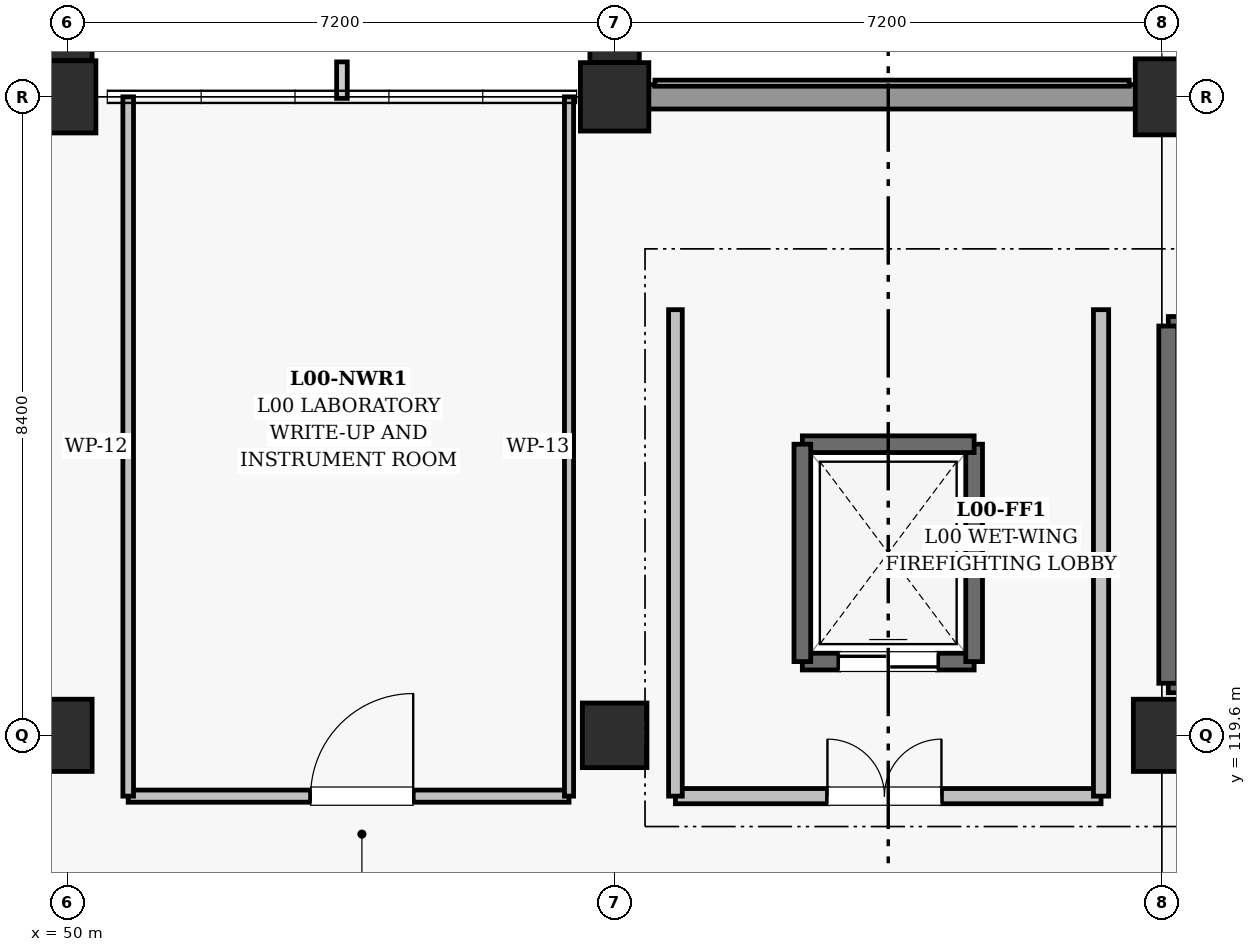
"""IFC4 building model, lengths in metres.
Left out: names, types, materials, properties, quantities, classifications, styles, units other than length and angle.
Written with IfcOpenShell. Run it as: python <this file> out.ifc"""

import sys

from ifc_helpers import new_model, si_unit, direction, frame, frame_2d, origin, origin_2d, place, context, subcontext, project, spatial, rectangle, extrude, element, fill, save


model = new_model("IFC4")
c1 = context("Model", 3, precision=1e-05, world=origin(), true_north=direction((0.0, 1.0)))
c2 = subcontext(c1, "Body", "Model", "MODEL_VIEW")
j1 = project(units=[si_unit("LENGTHUNIT", "METRE"), si_unit("PLANEANGLEUNIT", "RADIAN")], contexts=[c1])
p1 = place(None, origin())
s1 = spatial("IfcSite", under=j1, at=p1, CompositionType="ELEMENT")
p2 = place(p1, origin())
s2 = spatial("IfcBuilding", under=s1, at=p2, CompositionType="ELEMENT")
p3 = place(p2, origin())
s3 = spatial("IfcBuildingStorey", under=s2, at=p3, CompositionType="ELEMENT", Elevation=0.0)
p4 = place(p3, frame((50.0, 119.6, 0.0), z_axis=(0.0, 0.0, 1.0), x_axis=(1.0, 0.0, 0.0)))
e1 = element("IfcColumn", 1, at=p4, inside=s3, PredefinedType="COLUMN", context=c2, shape_type="SweptSolid", body=[
    extrude(rectangle(XDim=0.65, YDim=0.95, at=origin_2d()), origin(), (0.0, 0.0, 1.0), 5.4),
])
p5 = place(p3, frame((50.0, 128.0, 0.0), z_axis=(0.0, 0.0, 1.0), x_axis=(1.0, 0.0, 0.0)))
e2 = element("IfcColumn", 2, at=p5, inside=s3, PredefinedType="COLUMN", context=c2, shape_type="SweptSolid", body=[
    extrude(rectangle(XDim=0.75, YDim=0.95, at=origin_2d()), origin(), (0.0, 0.0, 1.0), 5.4),
])
p6 = place(p3, frame((57.2, 119.6, 0.0), z_axis=(0.0, 0.0, 1.0), x_axis=(1.0, 0.0, 0.0)))
e3 = element("IfcColumn", 3, at=p6, inside=s3, PredefinedType="COLUMN", context=c2, shape_type="SweptSolid", body=[
    extrude(rectangle(XDim=0.85, YDim=0.85, at=origin_2d()), origin(), (0.0, 0.0, 1.0), 5.4),
])
p7 = place(p3, frame((57.2, 128.0, 0.0), z_axis=(0.0, 0.0, 1.0), x_axis=(1.0, 0.0, 0.0)))
e4 = element("IfcColumn", 4, at=p7, inside=s3, PredefinedType="COLUMN", context=c2, shape_type="SweptSolid", body=[
    extrude(rectangle(XDim=0.9, YDim=0.9, at=origin_2d()), origin(), (0.0, 0.0, 1.0), 5.4),
])
p8 = place(p3, frame((64.4, 119.6, 0.0), z_axis=(0.0, 0.0, 1.0), x_axis=(1.0, 0.0, 0.0)))
e5 = element("IfcColumn", 5, at=p8, inside=s3, PredefinedType="COLUMN", context=c2, shape_type="SweptSolid", body=[
    extrude(rectangle(XDim=0.75, YDim=0.95, at=origin_2d()), origin(), (0.0, 0.0, 1.0), 5.4),
])
p9 = place(p3, frame((64.4, 128.0, 0.0), z_axis=(0.0, 0.0, 1.0), x_axis=(1.0, 0.0, 0.0)))
e6 = element("IfcColumn", 6, at=p9, inside=s3, PredefinedType="COLUMN", context=c2, shape_type="SweptSolid", body=[
    extrude(rectangle(XDim=0.7, YDim=1.0, at=origin_2d()), origin(), (0.0, 0.0, 1.0), 5.4),
])
for number, where, z_axis, x_axis in (
    (7, (50.0, 128.953, 0.0), (0.0, 0.0, 1.0), (1.0, 0.0, 0.0)),
    (8, (57.2, 128.928, 0.0), (0.0, 0.0, 1.0), (1.0, 0.0, 0.0)),
):
    element("IfcColumn", number, at=place(p3, frame(where, z_axis=z_axis, x_axis=x_axis)), inside=s3, PredefinedType="PILASTER", context=c2, shape_type="SweptSolid", body=[
        extrude(rectangle(XDim=0.65, YDim=0.95, at=origin_2d()), origin(), (0.0, 0.0, 1.0), 5.4),
    ])
p10 = place(p3, frame((57.63, 128.0, 0.0), z_axis=(0.0, 0.0, 1.0), x_axis=(1.0, 0.0, 0.0)))
e9 = element("IfcWall", 9, at=p10, inside=s3, PredefinedType="SOLIDWALL", context=c2, shape_type="SweptSolid", body=[
    extrude(rectangle(XDim=6.44, YDim=0.32, at=frame_2d((3.22, 0.0))), origin(), (0.0, 0.0, 1.0), 4.355),
])
p11 = place(p3, frame((64.485, 120.285, 0.0), z_axis=(0.0, 0.0, 1.0), x_axis=(1.0, 0.0, 0.0)))
e10 = element("IfcWall", 10, at=p11, inside=s3, PredefinedType="SHEAR", context=c2, shape_type="SweptSolid", body=[
    extrude(rectangle(XDim=10.63, YDim=0.25, at=frame_2d((5.315, 0.0))), origin(), (0.0, 0.0, 1.0), 5.075),
])
p12 = place(p11, frame((0.55, 0.0, 0.0)))
e11 = element("IfcOpeningElement", 11, at=p12, cuts=e10, PredefinedType="OPENING", context=c2, shape_type="SweptSolid", body=[
    extrude(rectangle(XDim=1.2, YDim=2.15, at=frame_2d((0.6, 1.075))), frame((0.0, 0.135, 0.0), z_axis=(0.0, -1.0, 0.0), x_axis=(1.0, 0.0, 0.0)), (0.0, 0.0, 1.0), 0.27),
])
p13 = place(p3, frame((75.115, 124.985, 0.0), z_axis=(0.0, 0.0, 1.0), x_axis=(-1.0, 0.0, 0.0)))
e12 = element("IfcWall", 12, at=p13, inside=s3, PredefinedType="SHEAR", context=c2, shape_type="SweptSolid", body=[
    extrude(rectangle(XDim=10.63, YDim=0.25, at=frame_2d((5.315, 0.0))), origin(), (0.0, 0.0, 1.0), 5.075),
])
p14 = place(p3, frame((64.485, 124.985, 0.0), z_axis=(0.0, 0.0, 1.0), x_axis=(0.0, -1.0, 0.0)))
e13 = element("IfcWall", 13, at=p14, inside=s3, PredefinedType="SHEAR", context=c2, shape_type="SweptSolid", body=[
    extrude(rectangle(XDim=4.7, YDim=0.25, at=frame_2d((2.35, 0.0))), origin(), (0.0, 0.0, 1.0), 5.075),
])
p15 = place(p3, frame((59.67, 120.57, 0.0), z_axis=(0.0, 0.0, 1.0), x_axis=(1.0, 0.0, 0.0)))
e14 = element("IfcWall", 14, at=p15, inside=s3, PredefinedType="SHEAR", context=c2, shape_type="SweptSolid", body=[
    extrude(rectangle(XDim=2.26, YDim=0.22, at=frame_2d((1.13, 0.0))), origin(), (0.0, 0.0, 1.0), 5.075),
])
p16 = place(p15, frame((0.48, 0.0, 0.0)))
e15 = element("IfcOpeningElement", 15, at=p16, cuts=e14, PredefinedType="OPENING", context=c2, shape_type="SweptSolid", body=[
    extrude(rectangle(XDim=1.3, YDim=2.2, at=frame_2d((0.65, 1.1))), frame((0.0, 0.12, 0.0), z_axis=(0.0, -1.0, 0.0), x_axis=(1.0, 0.0, 0.0)), (0.0, 0.0, 1.0), 0.24),
])
p17 = place(p3, frame((61.93, 120.57, 0.0), z_axis=(0.0, 0.0, 1.0), x_axis=(0.0, 1.0, 0.0)))
e16 = element("IfcWall", 16, at=p17, inside=s3, PredefinedType="SHEAR", context=c2, shape_type="SweptSolid", body=[
    extrude(rectangle(XDim=2.86, YDim=0.22, at=frame_2d((1.43, 0.0))), origin(), (0.0, 0.0, 1.0), 5.075),
])
p18 = place(p3, frame((61.93, 123.43, 0.0), z_axis=(0.0, 0.0, 1.0), x_axis=(-1.0, 0.0, 0.0)))
e17 = element("IfcWall", 17, at=p18, inside=s3, PredefinedType="SHEAR", context=c2, shape_type="SweptSolid", body=[
    extrude(rectangle(XDim=2.26, YDim=0.22, at=frame_2d((1.13, 0.0))), origin(), (0.0, 0.0, 1.0), 5.075),
])
p19 = place(p3, frame((59.67, 123.43, 0.0), z_axis=(0.0, 0.0, 1.0), x_axis=(0.0, -1.0, 0.0)))
e18 = element("IfcWall", 18, at=p19, inside=s3, PredefinedType="SHEAR", context=c2, shape_type="SweptSolid", body=[
    extrude(rectangle(XDim=2.86, YDim=0.22, at=frame_2d((1.43, 0.0))), origin(), (0.0, 0.0, 1.0), 5.075),
])
p20 = place(p3, frame((58.0, 118.8, 0.0), z_axis=(0.0, 0.0, 1.0), x_axis=(1.0, 0.0, 0.0)))
e19 = element("IfcWall", 19, at=p20, inside=s3, PredefinedType="SOLIDWALL", context=c2, shape_type="SweptSolid", body=[
    extrude(rectangle(XDim=5.6, YDim=0.2, at=frame_2d((2.8, 0.0))), origin(), (0.0, 0.0, 1.0), 4.44),
])
p21 = place(p20, frame((2.0, 0.0, 0.0)))
e20 = element("IfcOpeningElement", 20, at=p21, cuts=e19, PredefinedType="OPENING", context=c2, shape_type="SweptSolid", body=[
    extrude(rectangle(XDim=1.5, YDim=2.2, at=frame_2d((0.75, 1.1))), frame((0.0, 0.11, 0.0), z_axis=(0.0, -1.0, 0.0), x_axis=(1.0, 0.0, 0.0)), (0.0, 0.0, 1.0), 0.22),
])
p22 = place(p3, frame((58.0, 118.8, 0.0), z_axis=(0.0, 0.0, 1.0), x_axis=(0.0, 1.0, 0.0)))
e21 = element("IfcWall", 21, at=p22, inside=s3, PredefinedType="SOLIDWALL", context=c2, shape_type="SweptSolid", body=[
    extrude(rectangle(XDim=6.4, YDim=0.18, at=frame_2d((3.2, 0.0))), origin(), (0.0, 0.0, 1.0), 4.26),
])
p23 = place(p3, frame((63.6, 118.8, 0.0), z_axis=(0.0, 0.0, 1.0), x_axis=(0.0, 1.0, 0.0)))
e22 = element("IfcWall", 22, at=p23, inside=s3, PredefinedType="SOLIDWALL", context=c2, shape_type="SweptSolid", body=[
    extrude(rectangle(XDim=6.4, YDim=0.2, at=frame_2d((3.2, 0.0))), origin(), (0.0, 0.0, 1.0), 4.26),
])
p24 = place(p3, frame((50.8, 118.8, 0.0), z_axis=(0.0, 0.0, 1.0), x_axis=(1.0, 0.0, 0.0)))
e23 = element("IfcWall", 23, at=p24, inside=s3, PredefinedType="PARTITIONING", context=c2, shape_type="SweptSolid", body=[
    extrude(rectangle(XDim=5.8, YDim=0.16, at=frame_2d((2.9, 0.0))), origin(), (0.0, 0.0, 1.0), 4.44),
])
p25 = place(p24, frame((2.4, 0.0, 0.0)))
e24 = element("IfcOpeningElement", 24, at=p25, cuts=e23, PredefinedType="OPENING", context=c2, shape_type="SweptSolid", body=[
    extrude(rectangle(XDim=1.35, YDim=2.2, at=frame_2d((0.675, 1.1))), frame((0.0, 0.09, 0.0), z_axis=(0.0, -1.0, 0.0), x_axis=(1.0, 0.0, 0.0)), (0.0, 0.0, 1.0), 0.18),
])
p26 = place(p3, frame((50.8, 118.8, 0.0), z_axis=(0.0, 0.0, 1.0), x_axis=(0.0, 1.0, 0.0)))
e25 = element("IfcWall", 25, at=p26, inside=s3, PredefinedType="PARTITIONING", context=c2, shape_type="SweptSolid", body=[
    extrude(rectangle(XDim=9.2, YDim=0.14, at=frame_2d((4.6, 0.0))), origin(), (0.0, 0.0, 1.0), 4.31),
])
p27 = place(p3, frame((56.6, 118.8, 0.0), z_axis=(0.0, 0.0, 1.0), x_axis=(0.0, 1.0, 0.0)))
e26 = element("IfcWall", 26, at=p27, inside=s3, PredefinedType="PARTITIONING", context=c2, shape_type="SweptSolid", body=[
    extrude(rectangle(XDim=9.2, YDim=0.12, at=frame_2d((4.6, 0.0))), origin(), (0.0, 0.0, 1.0), 4.31),
])
p28 = place(p16, origin())
e27 = element("IfcDoor", 27, at=p28, inside=s3, OperationType="DOUBLE_DOOR_SLIDING", PredefinedType="DOOR", context=c2, shape_type="SweptSolid", body=[
    extrude(rectangle(XDim=1.3, YDim=2.2, at=frame_2d((0.65, 1.1))), frame((0.0, 0.025, 0.0), z_axis=(0.0, -1.0, 0.0), x_axis=(1.0, 0.0, 0.0)), (0.0, 0.0, 1.0), 0.05),
])
fill(e15, e27)
p29 = place(p21, origin())
e28 = element("IfcDoor", 28, at=p29, inside=s3, OperationType="DOUBLE_DOOR_SINGLE_SWING", PredefinedType="DOOR", context=c2, shape_type="SweptSolid", body=[
    extrude(rectangle(XDim=1.5, YDim=2.2, at=frame_2d((0.75, 1.1))), frame((0.0, 0.025, 0.0), z_axis=(0.0, -1.0, 0.0), x_axis=(1.0, 0.0, 0.0)), (0.0, 0.0, 1.0), 0.05),
])
fill(e20, e28)
p30 = place(p25, origin())
e29 = element("IfcDoor", 29, at=p30, inside=s3, OperationType="SINGLE_SWING_RIGHT", PredefinedType="DOOR", context=c2, shape_type="SweptSolid", body=[
    extrude(rectangle(XDim=1.35, YDim=2.2, at=frame_2d((0.675, 1.1))), frame((0.0, 0.025, 0.0), z_axis=(0.0, -1.0, 0.0), x_axis=(1.0, 0.0, 0.0)), (0.0, 0.0, 1.0), 0.05),
])
fill(e24, e29)
save(model, sys.argv[1])
